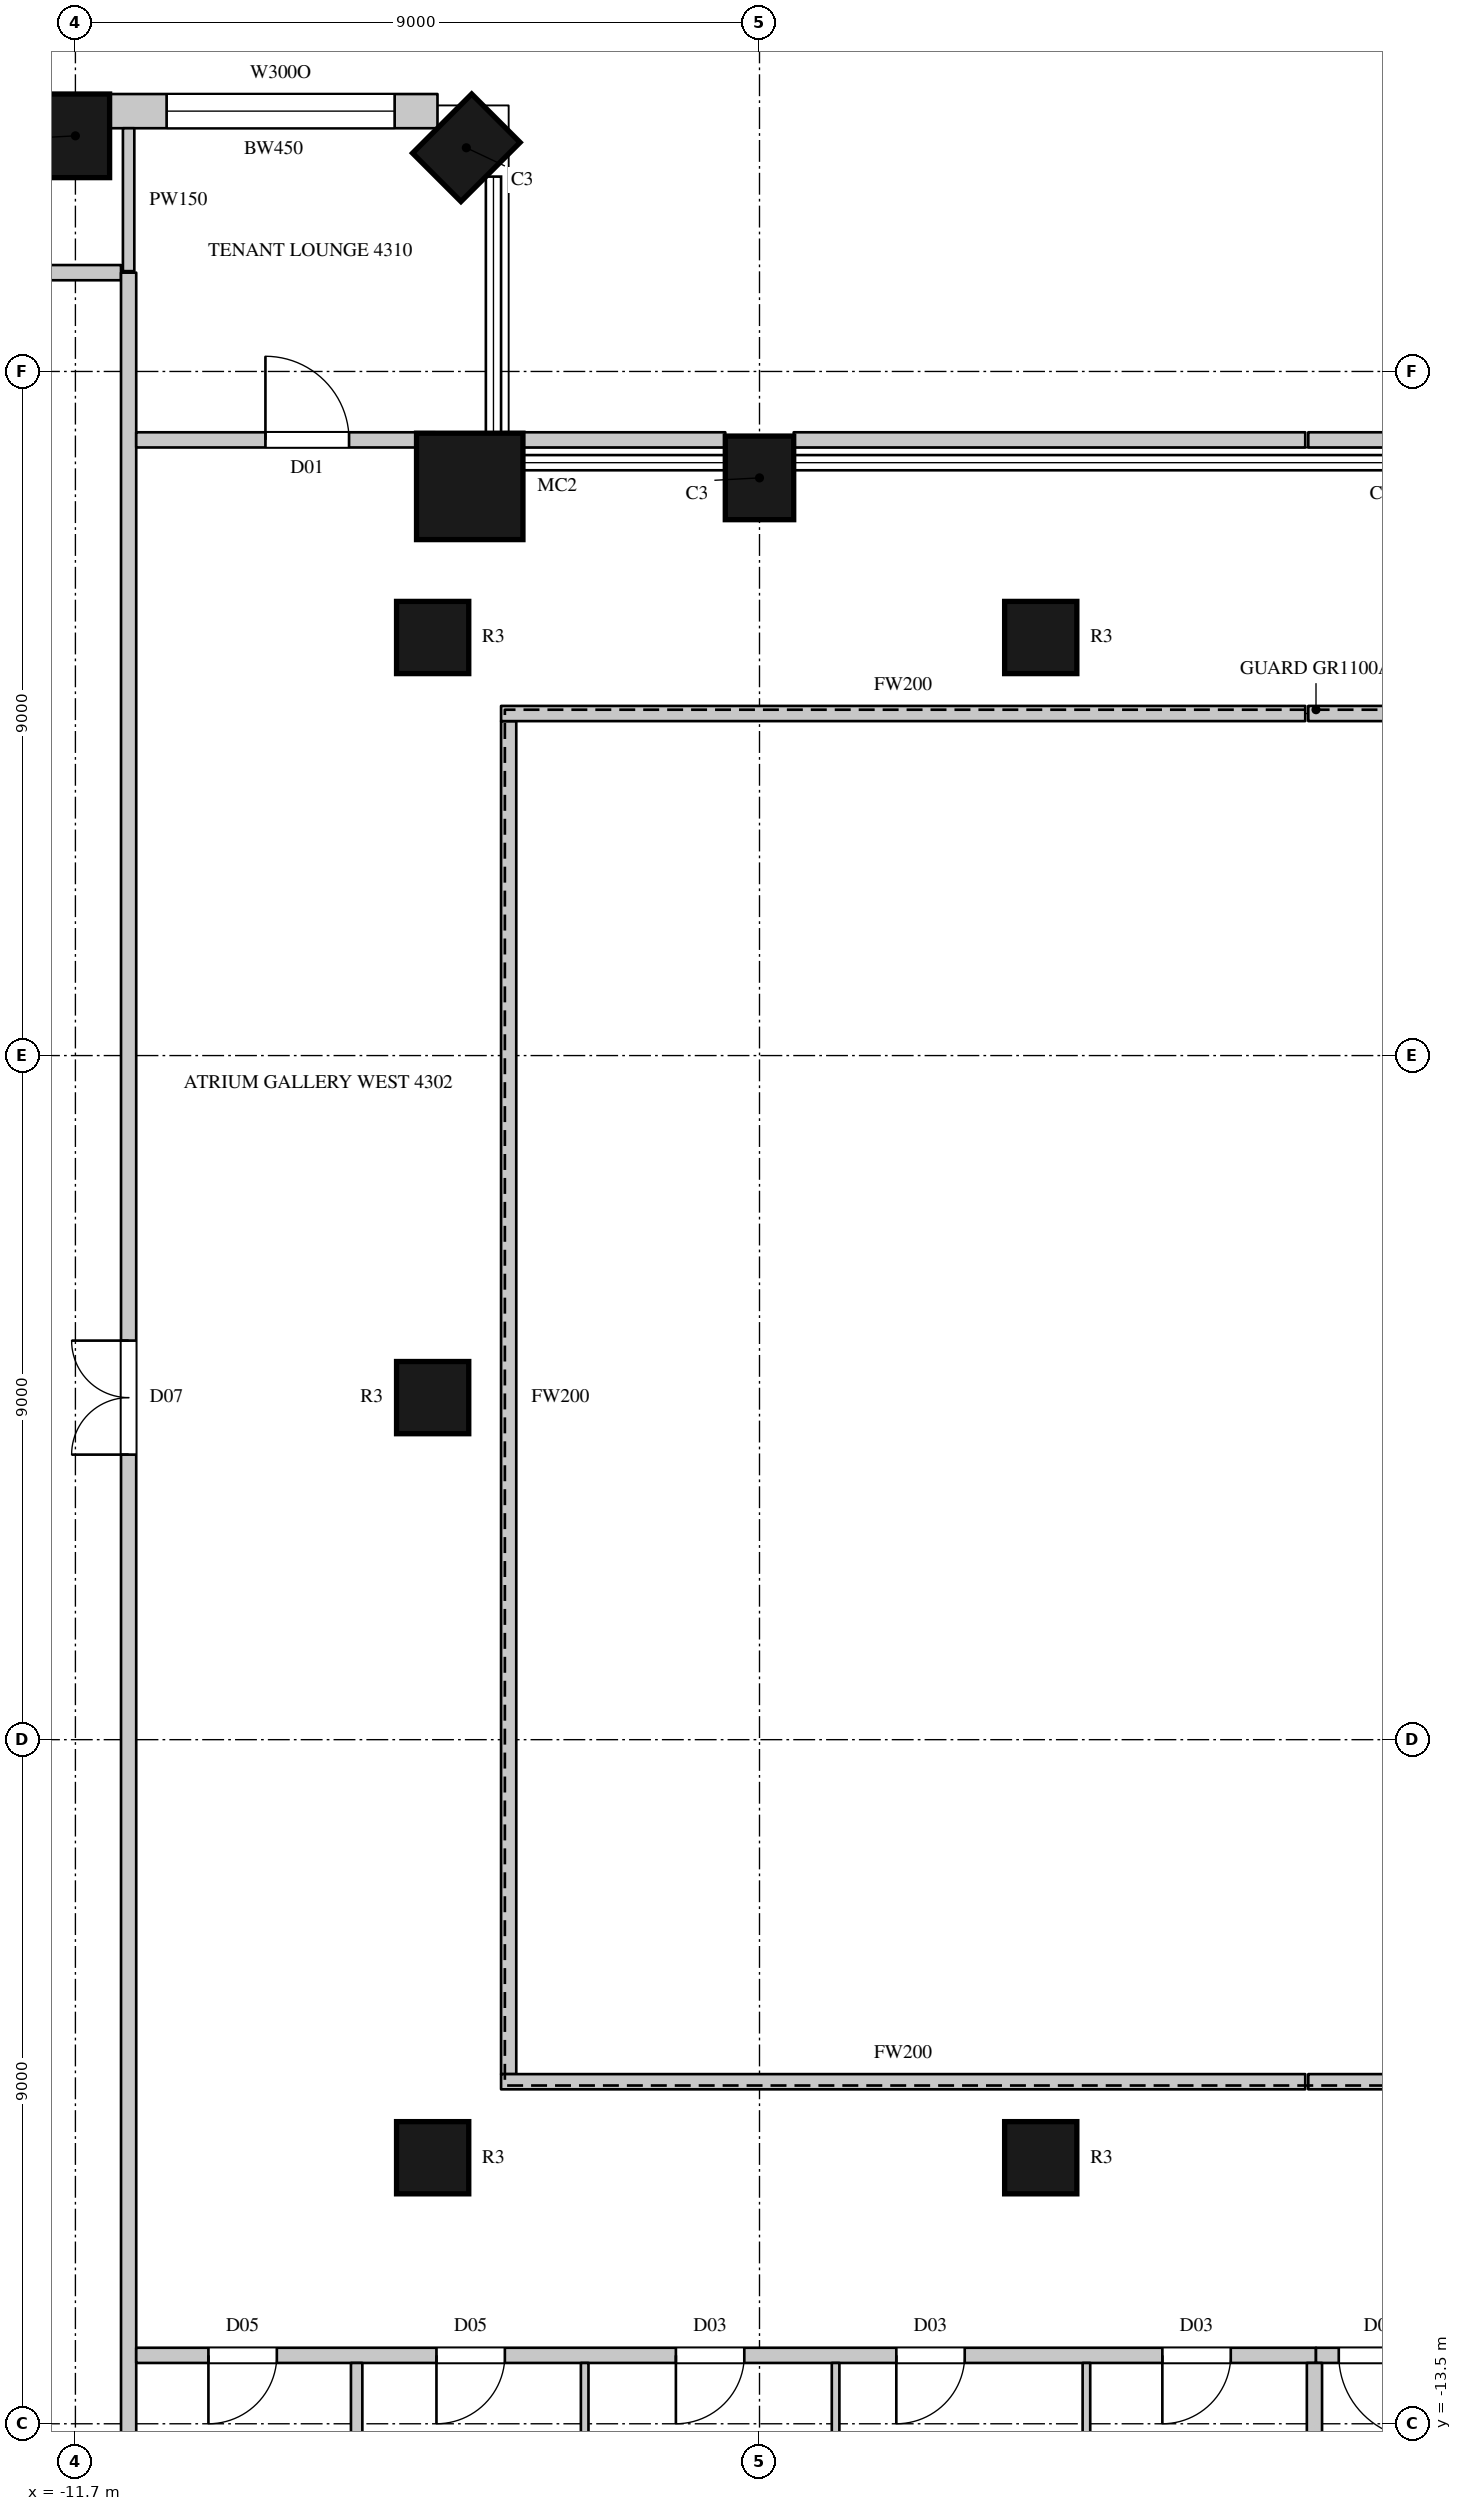
"""IFC4 building model, lengths in metres.
Left out: names, types, materials, properties, quantities, classifications, styles, units other than length and angle.
Written with IfcOpenShell. Run it as: python <this file> out.ifc"""

import sys

from ifc_helpers import new_model, si_unit, direction, frame, frame_2d, origin, origin_2d, place, context, subcontext, project, spatial, rectangle, circle, extrude, element, fill, save


model = new_model("IFC4")
c1 = context("Model", 3, precision=1e-05, world=origin(), true_north=direction((0.0, 1.0)))
c2 = subcontext(c1, "Body", "Model", "MODEL_VIEW")
j1 = project(units=[si_unit("LENGTHUNIT", "METRE"), si_unit("PLANEANGLEUNIT", "RADIAN")], contexts=[c1])
p1 = place(None, origin())
s1 = spatial("IfcSite", under=j1, at=p1, CompositionType="ELEMENT")
p2 = place(p1, origin())
s2 = spatial("IfcBuilding", under=s1, at=p2, CompositionType="ELEMENT")
p3 = place(p2, frame((0.0, 0.0, 197.4)))
s3 = spatial("IfcBuildingStorey", under=s2, at=p3, CompositionType="ELEMENT", Elevation=197.4)
p4 = place(p3, frame((-2.7, 12.1, 0.0), z_axis=(0.0, 0.0, 1.0), x_axis=(-1.0, 0.0, 0.0)))
e1 = element("IfcColumn", 1, at=p4, inside=s3, PredefinedType="COLUMN", context=c2, shape_type="SweptSolid", body=[
    extrude(rectangle(XDim=0.9, YDim=1.1, at=origin_2d()), origin(), (0.0, 0.0, 1.0), 4.1),
])
p5 = place(p3, frame((-6.512, 11.988, 0.0), z_axis=(0.0, 0.0, 1.0), x_axis=(1.0, 0.0, 0.0)))
e2 = element("IfcColumn", 2, at=p5, inside=s3, PredefinedType="COLUMN", context=c2, shape_type="SweptSolid", body=[
    extrude(circle(Radius=0.7, at=origin_2d()), origin(), (0.0, 0.0, 1.0), 4.1),
])
for number, where, z_axis, x_axis in (
    (3, (-6.557, 16.443, 0.0), (0.0, 0.0, 1.0), (-0.707, 0.707, 0.0)),
    (4, (-11.7, 16.6, 0.0), (0.0, 0.0, 1.0), (-1.0, 0.0, 0.0)),
):
    element("IfcColumn", number, at=place(p3, frame(where, z_axis=z_axis, x_axis=x_axis)), inside=s3, PredefinedType="COLUMN", context=c2, shape_type="SweptSolid", body=[
        extrude(rectangle(XDim=0.9, YDim=1.1, at=origin_2d()), origin(), (0.0, 0.0, 1.0), 4.1),
    ])
for number, where, z_axis, x_axis in (
    (5, (-7.0, -10.0, 0.0), (0.0, 0.0, 1.0), (1.0, 0.0, 0.0)),
    (6, (-7.0, 0.0, 0.0), (0.0, 0.0, 1.0), (1.0, 0.0, 0.0)),
    (7, (-7.0, 10.0, 0.0), (0.0, 0.0, 1.0), (1.0, 0.0, 0.0)),
    (8, (1.0, -10.0, 0.0), (0.0, 0.0, 1.0), (1.0, 0.0, 0.0)),
    (9, (1.0, 10.0, 0.0), (0.0, 0.0, 1.0), (1.0, 0.0, 0.0)),
):
    element("IfcColumn", number, at=place(p3, frame(where, z_axis=z_axis, x_axis=x_axis)), inside=s3, PredefinedType="COLUMN", context=c2, shape_type="SweptSolid", body=[
        extrude(circle(Radius=0.475, at=origin_2d()), origin(), (0.0, 0.0, 1.0), 4.1),
    ])
p6 = place(p3, frame((-6.936, 16.925, 0.0), z_axis=(0.0, 0.0, 1.0), x_axis=(-1.0, 0.0, 0.0)))
e10 = element("IfcWall", 10, at=p6, inside=s3, PredefinedType="SOLIDWALL", context=c2, shape_type="SweptSolid", body=[
    extrude(rectangle(XDim=4.314, YDim=0.45, at=frame_2d((2.157, 0.0))), origin(), (0.0, 0.0, 1.0), 3.8),
])
p7 = place(p6, frame((0.564, 0.0, 1.05)))
e11 = element("IfcOpeningElement", 11, at=p7, cuts=e10, PredefinedType="OPENING", context=c2, shape_type="SweptSolid", body=[
    extrude(rectangle(XDim=3.0, YDim=2.4, at=frame_2d((1.5, 1.2))), frame((0.0, 0.235, 0.0), z_axis=(0.0, -1.0, 0.0), x_axis=(1.0, 0.0, 0.0)), (0.0, 0.0, 1.0), 0.47),
])
p8 = place(p3, frame((-13.97, 14.8, 0.0), z_axis=(0.0, 0.0, 1.0), x_axis=(1.0, 0.0, 0.0)))
e12 = element("IfcWall", 12, at=p8, inside=s3, PredefinedType="PARTITIONING", context=c2, shape_type="SweptSolid", body=[
    extrude(rectangle(XDim=2.87, YDim=0.2, at=frame_2d((1.435, 0.0))), origin(), (0.0, 0.0, 1.0), 3.8),
])
p9 = place(p3, frame((-11.0, -14.8, 0.0), z_axis=(0.0, 0.0, 1.0), x_axis=(0.0, 1.0, 0.0)))
e13 = element("IfcWall", 13, at=p9, inside=s3, PredefinedType="PARTITIONING", context=c2, shape_type="SweptSolid", body=[
    extrude(rectangle(XDim=29.6, YDim=0.2, at=frame_2d((14.8, 0.0))), origin(), (0.0, 0.0, 1.0), 3.8),
])
p10 = place(p9, frame((14.05, 0.0, 0.0)))
e14 = element("IfcOpeningElement", 14, at=p10, cuts=e13, PredefinedType="OPENING", context=c2, shape_type="SweptSolid", body=[
    extrude(rectangle(XDim=1.5, YDim=2.4, at=frame_2d((0.75, 1.2))), frame((0.0, 0.11, 0.0), z_axis=(0.0, -1.0, 0.0), x_axis=(1.0, 0.0, 0.0)), (0.0, 0.0, 1.0), 0.22),
])
p11 = place(p3, frame((-10.9, -12.6, 0.0), z_axis=(0.0, 0.0, 1.0), x_axis=(1.0, 0.0, 0.0)))
e15 = element("IfcWall", 15, at=p11, inside=s3, PredefinedType="PARTITIONING", context=c2, shape_type="SweptSolid", body=[
    extrude(rectangle(XDim=15.521, YDim=0.2, at=frame_2d((7.76, 0.0))), origin(), (0.0, 0.0, 1.0), 3.8),
])
p12 = place(p11, frame((0.95, 0.0, 0.0)))
e16 = element("IfcOpeningElement", 16, at=p12, cuts=e15, PredefinedType="OPENING", context=c2, shape_type="SweptSolid", body=[
    extrude(rectangle(XDim=0.9, YDim=2.2, at=frame_2d((0.45, 1.1))), frame((0.0, 0.11, 0.0), z_axis=(0.0, -1.0, 0.0), x_axis=(1.0, 0.0, 0.0)), (0.0, 0.0, 1.0), 0.22),
])
p13 = place(p11, frame((3.95, 0.0, 0.0)))
e17 = element("IfcOpeningElement", 17, at=p13, cuts=e15, PredefinedType="OPENING", context=c2, shape_type="SweptSolid", body=[
    extrude(rectangle(XDim=0.9, YDim=2.2, at=frame_2d((0.45, 1.1))), frame((0.0, 0.11, 0.0), z_axis=(0.0, -1.0, 0.0), x_axis=(1.0, 0.0, 0.0)), (0.0, 0.0, 1.0), 0.22),
])
p14 = place(p11, frame((7.1, 0.0, 0.0)))
e18 = element("IfcOpeningElement", 18, at=p14, cuts=e15, PredefinedType="OPENING", context=c2, shape_type="SweptSolid", body=[
    extrude(rectangle(XDim=0.9, YDim=2.2, at=frame_2d((0.45, 1.1))), frame((0.0, 0.11, 0.0), z_axis=(0.0, -1.0, 0.0), x_axis=(1.0, 0.0, 0.0)), (0.0, 0.0, 1.0), 0.22),
])
p15 = place(p11, frame((10.0, 0.0, 0.0)))
e19 = element("IfcOpeningElement", 19, at=p15, cuts=e15, PredefinedType="OPENING", context=c2, shape_type="SweptSolid", body=[
    extrude(rectangle(XDim=0.9, YDim=2.2, at=frame_2d((0.45, 1.1))), frame((0.0, 0.11, 0.0), z_axis=(0.0, -1.0, 0.0), x_axis=(1.0, 0.0, 0.0)), (0.0, 0.0, 1.0), 0.22),
])
p16 = place(p11, frame((13.5, 0.0, 0.0)))
e20 = element("IfcOpeningElement", 20, at=p16, cuts=e15, PredefinedType="OPENING", context=c2, shape_type="SweptSolid", body=[
    extrude(rectangle(XDim=0.9, YDim=2.2, at=frame_2d((0.45, 1.1))), frame((0.0, 0.11, 0.0), z_axis=(0.0, -1.0, 0.0), x_axis=(1.0, 0.0, 0.0)), (0.0, 0.0, 1.0), 0.22),
])
p17 = place(p3, frame((-10.9, 12.6, 0.0), z_axis=(0.0, 0.0, 1.0), x_axis=(1.0, 0.0, 0.0)))
e21 = element("IfcWall", 21, at=p17, inside=s3, PredefinedType="PARTITIONING", context=c2, shape_type="SweptSolid", body=[
    extrude(rectangle(XDim=3.935, YDim=0.2, at=frame_2d((1.968, 0.0))), origin(), (0.0, 0.0, 1.0), 3.8),
])
p18 = place(p17, frame((1.7, 0.0, 0.0)))
e22 = element("IfcOpeningElement", 22, at=p18, cuts=e21, PredefinedType="OPENING", context=c2, shape_type="SweptSolid", body=[
    extrude(rectangle(XDim=1.1, YDim=2.4, at=frame_2d((0.55, 1.2))), frame((0.0, 0.11, 0.0), z_axis=(0.0, -1.0, 0.0), x_axis=(1.0, 0.0, 0.0)), (0.0, 0.0, 1.0), 0.22),
])
p19 = place(p3, frame((-6.06, 12.6, 0.0), z_axis=(0.0, 0.0, 1.0), x_axis=(1.0, 0.0, 0.0)))
e23 = element("IfcWall", 23, at=p19, inside=s3, PredefinedType="PARTITIONING", context=c2, shape_type="SweptSolid", body=[
    extrude(rectangle(XDim=2.91, YDim=0.2, at=frame_2d((1.455, 0.0))), origin(), (0.0, 0.0, 1.0), 3.8),
])
p20 = place(p3, frame((-2.25, 12.6, 0.0), z_axis=(0.0, 0.0, 1.0), x_axis=(1.0, 0.0, 0.0)))
e24 = element("IfcWall", 24, at=p20, inside=s3, PredefinedType="PARTITIONING", context=c2, shape_type="SweptSolid", body=[
    extrude(rectangle(XDim=6.73, YDim=0.2, at=frame_2d((3.365, 0.0))), origin(), (0.0, 0.0, 1.0), 3.8),
])
p21 = place(p3, frame((-6.0, -8.9, 0.0), z_axis=(0.0, 0.0, 1.0), x_axis=(0.0, 1.0, 0.0)))
e25 = element("IfcWall", 25, at=p21, inside=s3, PredefinedType="PARTITIONING", context=c2, shape_type="SweptSolid", body=[
    extrude(rectangle(XDim=17.8, YDim=0.2, at=frame_2d((8.9, 0.0))), origin(), (0.0, 0.0, 1.0), 3.8),
])
for number, where, z_axis, x_axis in (
    (26, (-6.1, -9.0, 0.0), (0.0, 0.0, 1.0), (1.0, 0.0, 0.0)),
    (27, (-6.1, 9.0, 0.0), (0.0, 0.0, 1.0), (1.0, 0.0, 0.0)),
):
    element("IfcWall", number, at=place(p3, frame(where, z_axis=z_axis, x_axis=x_axis)), inside=s3, PredefinedType="PARTITIONING", context=c2, shape_type="SweptSolid", body=[
        extrude(rectangle(XDim=10.58, YDim=0.2, at=frame_2d((5.29, 0.0))), origin(), (0.0, 0.0, 1.0), 3.8),
    ])
for number, where, z_axis, x_axis in (
    (28, (4.52, -9.0, 0.0), (0.0, 0.0, 1.0), (1.0, 0.0, 0.0)),
    (29, (4.52, 9.0, 0.0), (0.0, 0.0, 1.0), (1.0, 0.0, 0.0)),
):
    element("IfcWall", number, at=place(p3, frame(where, z_axis=z_axis, x_axis=x_axis)), inside=s3, PredefinedType="PARTITIONING", context=c2, shape_type="SweptSolid", body=[
        extrude(rectangle(XDim=3.58, YDim=0.2, at=frame_2d((1.79, 0.0))), origin(), (0.0, 0.0, 1.0), 3.8),
    ])
p22 = place(p3, frame((4.52, 12.6, 0.0), z_axis=(0.0, 0.0, 1.0), x_axis=(1.0, 0.0, 0.0)))
e30 = element("IfcWall", 30, at=p22, inside=s3, PredefinedType="PARTITIONING", context=c2, shape_type="SweptSolid", body=[
    extrude(rectangle(XDim=1.33, YDim=0.2, at=frame_2d((0.665, 0.0))), origin(), (0.0, 0.0, 1.0), 3.8),
])
p23 = place(p3, frame((-11.0, 14.82, 0.0), z_axis=(0.0, 0.0, 1.0), x_axis=(0.0, 1.0, 0.0)))
e31 = element("IfcWall", 31, at=p23, inside=s3, PredefinedType="PARTITIONING", context=c2, shape_type="SweptSolid", body=[
    extrude(rectangle(XDim=1.88, YDim=0.15, at=frame_2d((0.94, 0.0))), origin(), (0.0, 0.0, 1.0), 3.8),
])
p24 = place(p3, frame((-8.0, -16.7, 0.0), z_axis=(0.0, 0.0, 1.0), x_axis=(0.0, 1.0, 0.0)))
e32 = element("IfcWall", 32, at=p24, inside=s3, PredefinedType="PARTITIONING", context=c2, shape_type="SweptSolid", body=[
    extrude(rectangle(XDim=4.0, YDim=0.15, at=frame_2d((2.0, 0.0))), origin(), (0.0, 0.0, 1.0), 3.8),
])
p25 = place(p3, frame((4.621, -12.6, 0.0), z_axis=(0.0, 0.0, 1.0), x_axis=(1.0, 0.0, 0.0)))
e33 = element("IfcWall", 33, at=p25, inside=s3, PredefinedType="PARTITIONING", context=c2, shape_type="SweptSolid", body=[
    extrude(rectangle(XDim=1.659, YDim=0.2, at=frame_2d((0.83, 0.0))), origin(), (0.0, 0.0, 1.0), 3.8),
])
p26 = place(p25, frame((0.3, 0.0, 0.0)))
e34 = element("IfcOpeningElement", 34, at=p26, cuts=e33, PredefinedType="OPENING", context=c2, shape_type="SweptSolid", body=[
    extrude(rectangle(XDim=1.1, YDim=2.4, at=frame_2d((0.55, 1.2))), frame((0.0, 0.11, 0.0), z_axis=(0.0, -1.0, 0.0), x_axis=(1.0, 0.0, 0.0)), (0.0, 0.0, 1.0), 0.22),
])
p27 = place(p3, frame((4.601, -16.7, 0.0), z_axis=(0.0, 0.0, 1.0), x_axis=(0.0, 1.0, 0.0)))
e35 = element("IfcWall", 35, at=p27, inside=s3, PredefinedType="PARTITIONING", context=c2, shape_type="SweptSolid", body=[
    extrude(rectangle(XDim=4.0, YDim=0.2, at=frame_2d((2.0, 0.0))), origin(), (0.0, 0.0, 1.0), 3.8),
])
for number, where, z_axis, x_axis in (
    (36, (-5.0, -16.7, 0.0), (0.0, 0.0, 1.0), (0.0, 1.0, 0.0)),
    (37, (-1.699, -16.7, 0.0), (0.0, 0.0, 1.0), (0.0, 1.0, 0.0)),
):
    element("IfcWall", number, at=place(p3, frame(where, z_axis=z_axis, x_axis=x_axis)), inside=s3, PredefinedType="PARTITIONING", context=c2, shape_type="SweptSolid", body=[
        extrude(rectangle(XDim=4.0, YDim=0.1, at=frame_2d((2.0, 0.0))), origin(), (0.0, 0.0, 1.0), 3.8),
    ])
p28 = place(p3, frame((1.601, -16.7, 0.0), z_axis=(0.0, 0.0, 1.0), x_axis=(0.0, 1.0, 0.0)))
e38 = element("IfcWall", 38, at=p28, inside=s3, PredefinedType="PARTITIONING", context=c2, shape_type="SweptSolid", body=[
    extrude(rectangle(XDim=4.0, YDim=0.1, at=frame_2d((2.0, 0.0))), origin(), (0.0, 0.0, 1.0), 3.15),
])
p29 = place(p7, origin())
e39 = element("IfcWindow", 39, at=p29, inside=s3, PartitioningType="SINGLE_PANEL", PredefinedType="WINDOW", context=c2, shape_type="SweptSolid", body=[
    extrude(rectangle(XDim=3.0, YDim=2.4, at=frame_2d((1.5, 1.2))), frame((0.0, 0.135, 0.0), z_axis=(0.0, -1.0, 0.0), x_axis=(1.0, 0.0, 0.0)), (0.0, 0.0, 1.0), 0.06),
])
fill(e11, e39)
p30 = place(p10, origin())
e40 = element("IfcDoor", 40, at=p30, inside=s3, OperationType="DOUBLE_DOOR_SINGLE_SWING", PredefinedType="DOOR", context=c2, shape_type="SweptSolid", body=[
    extrude(rectangle(XDim=1.5, YDim=2.4, at=frame_2d((0.75, 1.2))), frame((0.0, 0.025, 0.0), z_axis=(0.0, -1.0, 0.0), x_axis=(1.0, 0.0, 0.0)), (0.0, 0.0, 1.0), 0.05),
])
fill(e14, e40)
p31 = place(p12, origin())
e41 = element("IfcDoor", 41, at=p31, inside=s3, OperationType="SINGLE_SWING_RIGHT", PredefinedType="DOOR", context=c2, shape_type="SweptSolid", body=[
    extrude(rectangle(XDim=0.9, YDim=2.2, at=frame_2d((0.45, 1.1))), frame((0.0, 0.025, 0.0), z_axis=(0.0, -1.0, 0.0), x_axis=(1.0, 0.0, 0.0)), (0.0, 0.0, 1.0), 0.05),
])
fill(e16, e41)
p32 = place(p13, origin())
e42 = element("IfcDoor", 42, at=p32, inside=s3, OperationType="SINGLE_SWING_RIGHT", PredefinedType="DOOR", context=c2, shape_type="SweptSolid", body=[
    extrude(rectangle(XDim=0.9, YDim=2.2, at=frame_2d((0.45, 1.1))), frame((0.0, 0.025, 0.0), z_axis=(0.0, -1.0, 0.0), x_axis=(1.0, 0.0, 0.0)), (0.0, 0.0, 1.0), 0.05),
])
fill(e17, e42)
p33 = place(p14, origin())
e43 = element("IfcDoor", 43, at=p33, inside=s3, OperationType="SINGLE_SWING_RIGHT", PredefinedType="DOOR", context=c2, shape_type="SweptSolid", body=[
    extrude(rectangle(XDim=0.9, YDim=2.2, at=frame_2d((0.45, 1.1))), frame((0.0, 0.025, 0.0), z_axis=(0.0, -1.0, 0.0), x_axis=(1.0, 0.0, 0.0)), (0.0, 0.0, 1.0), 0.05),
])
fill(e18, e43)
p34 = place(p15, origin())
e44 = element("IfcDoor", 44, at=p34, inside=s3, OperationType="SINGLE_SWING_RIGHT", PredefinedType="DOOR", context=c2, shape_type="SweptSolid", body=[
    extrude(rectangle(XDim=0.9, YDim=2.2, at=frame_2d((0.45, 1.1))), frame((0.0, 0.025, 0.0), z_axis=(0.0, -1.0, 0.0), x_axis=(1.0, 0.0, 0.0)), (0.0, 0.0, 1.0), 0.05),
])
fill(e19, e44)
p35 = place(p16, origin())
e45 = element("IfcDoor", 45, at=p35, inside=s3, OperationType="SINGLE_SWING_RIGHT", PredefinedType="DOOR", context=c2, shape_type="SweptSolid", body=[
    extrude(rectangle(XDim=0.9, YDim=2.2, at=frame_2d((0.45, 1.1))), frame((0.0, 0.025, 0.0), z_axis=(0.0, -1.0, 0.0), x_axis=(1.0, 0.0, 0.0)), (0.0, 0.0, 1.0), 0.05),
])
fill(e20, e45)
p36 = place(p18, origin())
e46 = element("IfcDoor", 46, at=p36, inside=s3, OperationType="SINGLE_SWING_LEFT", PredefinedType="DOOR", context=c2, shape_type="SweptSolid", body=[
    extrude(rectangle(XDim=1.1, YDim=2.4, at=frame_2d((0.55, 1.2))), frame((0.0, 0.025, 0.0), z_axis=(0.0, -1.0, 0.0), x_axis=(1.0, 0.0, 0.0)), (0.0, 0.0, 1.0), 0.05),
])
fill(e22, e46)
p37 = place(p26, origin())
e47 = element("IfcDoor", 47, at=p37, inside=s3, OperationType="SINGLE_SWING_LEFT", PredefinedType="DOOR", context=c2, shape_type="SweptSolid", body=[
    extrude(rectangle(XDim=1.1, YDim=2.4, at=frame_2d((0.55, 1.2))), frame((0.0, 0.025, 0.0), z_axis=(0.0, -1.0, 0.0), x_axis=(1.0, 0.0, 0.0)), (0.0, 0.0, 1.0), 0.05),
])
fill(e34, e47)
save(model, sys.argv[1])
